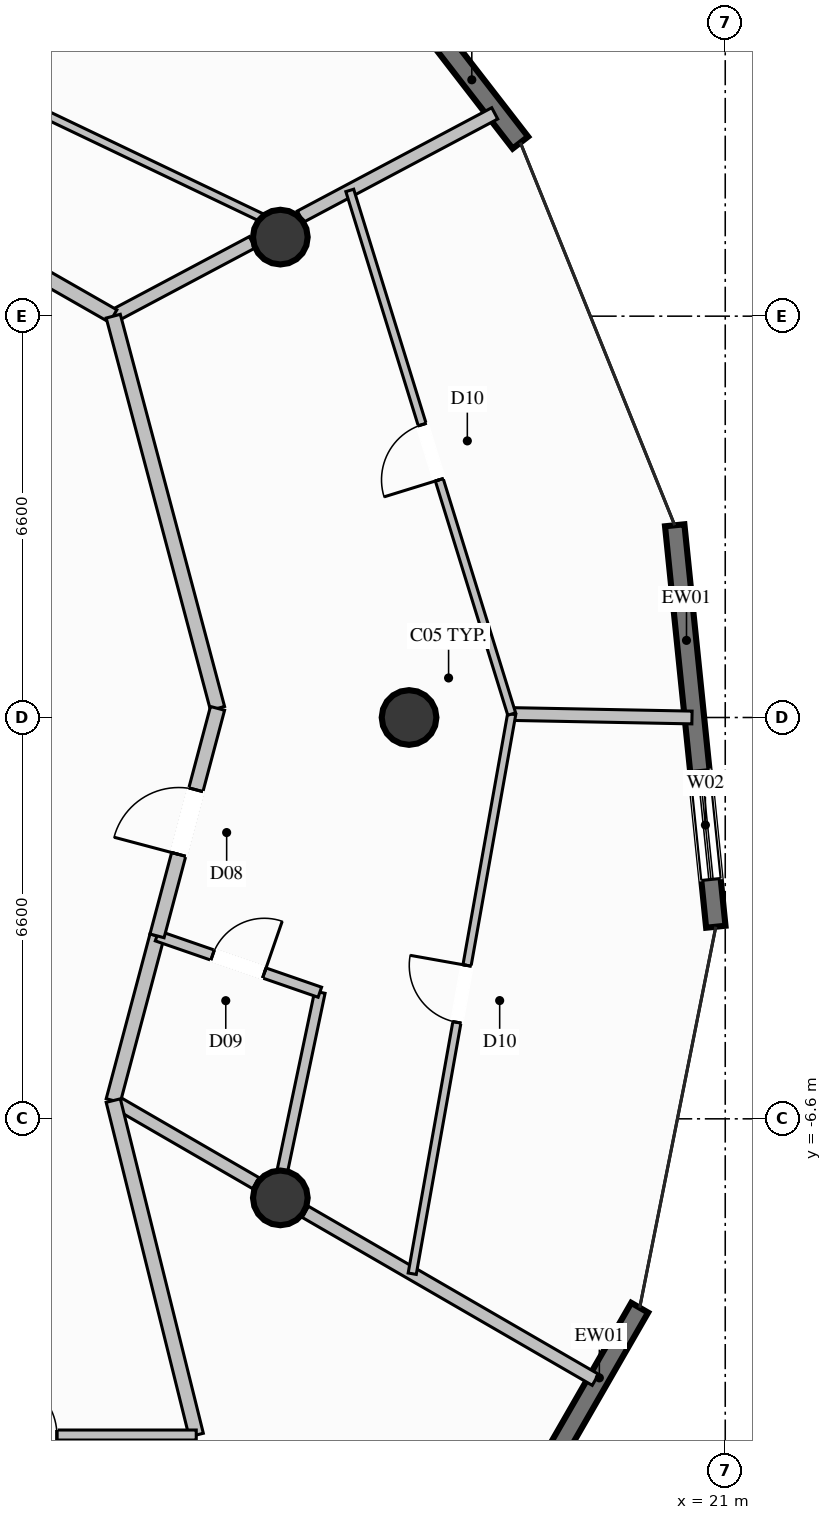
"""IFC4 building model, lengths in metres.
Left out: names, types, materials, properties, quantities, classifications, styles, units other than length and angle.
Written with IfcOpenShell. Run it as: python <this file> out.ifc"""

import sys

from ifc_helpers import new_model, si_unit, direction, frame, frame_2d, origin, origin_2d, place, context, subcontext, project, spatial, rectangle, circle, extrude, element, fill, save


model = new_model("IFC4")
c1 = context("Model", 3, precision=1e-05, world=origin(), true_north=direction((0.0, 1.0)))
c2 = subcontext(c1, "Body", "Model", "MODEL_VIEW")
j1 = project(units=[si_unit("LENGTHUNIT", "METRE"), si_unit("PLANEANGLEUNIT", "RADIAN")], contexts=[c1])
p1 = place(None, origin())
s1 = spatial("IfcSite", under=j1, at=p1, CompositionType="ELEMENT")
p2 = place(p1, origin())
s2 = spatial("IfcBuilding", under=s1, at=p2, CompositionType="ELEMENT")
p3 = place(p2, frame((0.0, 0.0, 191.2)))
s3 = spatial("IfcBuildingStorey", under=s2, at=p3, CompositionType="ELEMENT", Elevation=191.2)
for number, where, z_axis, x_axis in (
    (1, (15.8, 0.0, 0.0), (0.0, 0.0, 1.0), (1.0, 0.0, 0.0)),
    (2, (13.683, 7.9, 0.0), (0.0, 0.0, 1.0), (1.0, 0.0, 0.0)),
    (3, (13.683, -7.9, 0.0), (0.0, 0.0, 1.0), (1.0, 0.0, 0.0)),
):
    element("IfcColumn", number, at=place(p3, frame(where, z_axis=z_axis, x_axis=x_axis)), inside=s3, PredefinedType="COLUMN", context=c2, shape_type="SweptSolid", body=[
        extrude(circle(Radius=0.45, at=origin_2d()), origin(), (0.0, 0.0, 1.0), 3.6),
    ])
p4 = place(p3, frame((19.593, -9.706, 0.0), z_axis=(0.0, 0.0, 1.0), x_axis=(-0.498529467111, -0.866872753305, 0.0)))
e4 = element("IfcWall", 4, at=p4, inside=s3, PredefinedType="SOLIDWALL", context=c2, shape_type="SweptSolid", body=[
    extrude(rectangle(XDim=6.132, YDim=0.32, at=frame_2d((3.066, 0.0))), origin(), (0.0, 0.0, 1.0), 3.36),
])
p5 = place(p4, frame((2.912, 0.0, 0.35)))
e5 = element("IfcOpeningElement", 5, at=p5, cuts=e4, PredefinedType="OPENING", context=c2, shape_type="SweptSolid", body=[
    extrude(rectangle(XDim=1.8, YDim=2.6, at=frame_2d((0.9, 1.3))), frame((0.0, 0.17, 0.0), z_axis=(0.0, -1.0, 0.0), x_axis=(1.0, 0.0, 0.0)), (0.0, 0.0, 1.0), 0.34),
])
p6 = place(p3, frame((20.169, 3.161, 0.0), z_axis=(0.0, 0.0, 1.0), x_axis=(0.101867372905, -0.994797988708, 0.0)))
e6 = element("IfcWall", 6, at=p6, inside=s3, PredefinedType="SOLIDWALL", context=c2, shape_type="SweptSolid", body=[
    extrude(rectangle(XDim=6.636, YDim=0.32, at=frame_2d((3.318, 0.0))), origin(), (0.0, 0.0, 1.0), 3.36),
])
p7 = place(p6, frame((4.055, 0.0, 0.35)))
e7 = element("IfcOpeningElement", 7, at=p7, cuts=e6, PredefinedType="OPENING", context=c2, shape_type="SweptSolid", body=[
    extrude(rectangle(XDim=1.8, YDim=2.6, at=frame_2d((0.9, 1.3))), frame((0.0, 0.17, 0.0), z_axis=(0.0, -1.0, 0.0), x_axis=(1.0, 0.0, 0.0)), (0.0, 0.0, 1.0), 0.34),
])
p8 = place(p3, frame((13.48, 14.821, 0.0), z_axis=(0.0, 0.0, 1.0), x_axis=(0.611810985794, -0.791003993455, 0.0)))
e8 = element("IfcWall", 8, at=p8, inside=s3, PredefinedType="SOLIDWALL", context=c2, shape_type="SweptSolid", body=[
    extrude(rectangle(XDim=6.785, YDim=0.32, at=frame_2d((3.393, 0.0))), origin(), (0.0, 0.0, 1.0), 3.36),
])
p9 = place(p8, frame((2.123, 0.0, 0.35)))
e9 = element("IfcOpeningElement", 9, at=p9, cuts=e8, PredefinedType="OPENING", context=c2, shape_type="SweptSolid", body=[
    extrude(rectangle(XDim=1.8, YDim=2.6, at=frame_2d((0.9, 1.3))), frame((0.0, 0.17, 0.0), z_axis=(0.0, -1.0, 0.0), x_axis=(1.0, 0.0, 0.0)), (0.0, 0.0, 1.0), 0.34),
])
p10 = place(p3, frame((10.935, 6.6, 0.0), z_axis=(0.0, 0.0, 1.0), x_axis=(0.883041221412, 0.469295430711, 0.0)))
e10 = element("IfcWall", 10, at=p10, inside=s3, PredefinedType="PARTITIONING", context=c2, shape_type="SweptSolid", body=[
    extrude(rectangle(XDim=2.589, YDim=0.21, at=frame_2d((1.294, 0.0))), origin(), (0.0, 0.0, 1.0), 2.876),
])
p11 = place(p3, frame((14.012, 8.236, 0.0), z_axis=(0.0, 0.0, 1.0), x_axis=(0.883051974866, 0.469275196112, 0.0)))
e11 = element("IfcWall", 11, at=p11, inside=s3, PredefinedType="PARTITIONING", context=c2, shape_type="SweptSolid", body=[
    extrude(rectangle(XDim=3.62, YDim=0.21, at=frame_2d((1.81, 0.0))), origin(), (0.0, 0.0, 1.0), 3.36),
])
p12 = place(p3, frame((10.935, -6.3, 0.0), z_axis=(0.0, 0.0, 1.0), x_axis=(0.865378990195, -0.50111795351, 0.0)))
e12 = element("IfcWall", 12, at=p12, inside=s3, PredefinedType="PARTITIONING", context=c2, shape_type="SweptSolid", body=[
    extrude(rectangle(XDim=2.71, YDim=0.21, at=frame_2d((1.355, 0.0))), origin(), (0.0, 0.0, 1.0), 2.876),
])
p13 = place(p3, frame((14.093, -8.129, 0.0), z_axis=(0.0, 0.0, 1.0), x_axis=(0.865389908278, -0.501099098633, 0.0)))
e13 = element("IfcWall", 13, at=p13, inside=s3, PredefinedType="PARTITIONING", context=c2, shape_type="SweptSolid", body=[
    extrude(rectangle(XDim=5.514, YDim=0.21, at=frame_2d((2.757, 0.0))), origin(), (0.0, 0.0, 1.0), 3.36),
])
p14 = place(p3, frame((7.35, 8.65, 0.0), z_axis=(0.0, 0.0, 1.0), x_axis=(0.868112139229, -0.496368123193, 0.0)))
e14 = element("IfcWall", 14, at=p14, inside=s3, PredefinedType="PARTITIONING", context=c2, shape_type="SweptSolid", body=[
    extrude(rectangle(XDim=4.13, YDim=0.24, at=frame_2d((2.065, 0.0))), origin(), (0.0, 0.0, 1.0), 3.36),
])
p15 = place(p14, frame((1.515, 0.0, 0.0)))
e15 = element("IfcOpeningElement", 15, at=p15, cuts=e14, PredefinedType="OPENING", context=c2, shape_type="SweptSolid", body=[
    extrude(rectangle(XDim=1.1, YDim=2.3, at=frame_2d((0.55, 1.15))), frame((0.0, 0.13, 0.0), z_axis=(0.0, -1.0, 0.0), x_axis=(1.0, 0.0, 0.0)), (0.0, 0.0, 1.0), 0.26),
])
p16 = place(p3, frame((2.32, 13.502, 0.0), z_axis=(0.0, 0.0, 1.0), x_axis=(0.90230783313, -0.431092303656, 0.0)))
e16 = element("IfcWall", 16, at=p16, inside=s3, PredefinedType="PARTITIONING", context=c2, shape_type="SweptSolid", body=[
    extrude(rectangle(XDim=12.608, YDim=0.135, at=frame_2d((6.304, 0.0))), origin(), (0.0, 0.0, 1.0), 2.929),
])
p17 = place(p16, frame((5.829, 0.0, 0.0)))
e17 = element("IfcOpeningElement", 17, at=p17, cuts=e16, PredefinedType="OPENING", context=c2, shape_type="SweptSolid", body=[
    extrude(rectangle(XDim=0.95, YDim=2.1, at=frame_2d((0.475, 1.05))), frame((0.0, 0.078, 0.0), z_axis=(0.0, -1.0, 0.0), x_axis=(1.0, 0.0, 0.0)), (0.0, 0.0, 1.0), 0.155),
])
p18 = place(p3, frame((10.935, -6.3, 0.0), z_axis=(0.0, 0.0, 1.0), x_axis=(0.25685481711, 0.966450000221, 0.0)))
e18 = element("IfcWall", 18, at=p18, inside=s3, PredefinedType="PARTITIONING", context=c2, shape_type="SweptSolid", body=[
    extrude(rectangle(XDim=2.803, YDim=0.24, at=frame_2d((1.401, 0.0))), origin(), (0.0, 0.0, 1.0), 3.36),
])
p19 = place(p3, frame((13.631, -7.861, 0.0), z_axis=(0.0, 0.0, 1.0), x_axis=(0.205480954127, 0.978661114733, 0.0)))
e19 = element("IfcWall", 19, at=p19, inside=s3, PredefinedType="PLUMBINGWALL", context=c2, shape_type="SweptSolid", body=[
    extrude(rectangle(XDim=3.416, YDim=0.175, at=frame_2d((1.708, 0.0))), origin(), (0.0, 0.0, 1.0), 2.929),
])
p20 = place(p3, frame((11.655, -3.591, 0.0), z_axis=(0.0, 0.0, 1.0), x_axis=(0.944985049189, -0.327113522816, 0.0)))
e20 = element("IfcWall", 20, at=p20, inside=s3, PredefinedType="PLUMBINGWALL", context=c2, shape_type="SweptSolid", body=[
    extrude(rectangle(XDim=2.834, YDim=0.175, at=frame_2d((1.417, 0.0))), origin(), (0.0, 0.0, 1.0), 3.36),
])
p21 = place(p20, frame((0.967, 0.0, 0.0)))
e21 = element("IfcOpeningElement", 21, at=p21, cuts=e20, PredefinedType="OPENING", context=c2, shape_type="SweptSolid", body=[
    extrude(rectangle(XDim=0.9, YDim=2.1, at=frame_2d((0.45, 1.05))), frame((0.0, 0.098, 0.0), z_axis=(0.0, -1.0, 0.0), x_axis=(1.0, 0.0, 0.0)), (0.0, 0.0, 1.0), 0.195),
])
p22 = place(p3, frame((17.488, 0.057, 0.0), z_axis=(0.0, 0.0, 1.0), x_axis=(0.999815991263, -0.019182899042, 0.0)))
e22 = element("IfcWall", 22, at=p22, inside=s3, PredefinedType="PARTITIONING", context=c2, shape_type="SweptSolid", body=[
    extrude(rectangle(XDim=2.965, YDim=0.21, at=frame_2d((1.483, 0.0))), origin(), (0.0, 0.0, 1.0), 3.36),
])
p23 = place(p3, frame((12.65, 0.15, 0.0), z_axis=(0.0, 0.0, 1.0), x_axis=(-0.256934024047, 0.966428945804, 0.0)))
e23 = element("IfcWall", 23, at=p23, inside=s3, PredefinedType="PARTITIONING", context=c2, shape_type="SweptSolid", body=[
    extrude(rectangle(XDim=6.674, YDim=0.24, at=frame_2d((3.337, 0.0))), origin(), (0.0, 0.0, 1.0), 3.36),
])
p24 = place(p3, frame((11.655, -3.591, 0.0), z_axis=(0.0, 0.0, 1.0), x_axis=(0.257007037833, 0.966409531464, 0.0)))
e24 = element("IfcWall", 24, at=p24, inside=s3, PredefinedType="PARTITIONING", context=c2, shape_type="SweptSolid", body=[
    extrude(rectangle(XDim=3.871, YDim=0.24, at=frame_2d((1.936, 0.0))), origin(), (0.0, 0.0, 1.0), 3.042),
])
p25 = place(p24, frame((1.386, 0.0, 0.0)))
e25 = element("IfcOpeningElement", 25, at=p25, cuts=e24, PredefinedType="OPENING", context=c2, shape_type="SweptSolid", body=[
    extrude(rectangle(XDim=1.1, YDim=2.3, at=frame_2d((0.55, 1.15))), frame((0.0, 0.13, 0.0), z_axis=(0.0, -1.0, 0.0), x_axis=(1.0, 0.0, 0.0)), (0.0, 0.0, 1.0), 0.26),
])
p26 = place(p3, frame((15.852, -9.147, 0.0), z_axis=(0.0, 0.0, 1.0), x_axis=(0.17500689307, 0.984567208157, 0.0)))
e26 = element("IfcWall", 26, at=p26, inside=s3, PredefinedType="PARTITIONING", context=c2, shape_type="SweptSolid", body=[
    extrude(rectangle(XDim=9.348, YDim=0.135, at=frame_2d((4.674, 0.0))), origin(), (0.0, 0.0, 1.0), 3.36),
])
p27 = place(p26, frame((4.199, 0.0, 0.0)))
e27 = element("IfcOpeningElement", 27, at=p27, cuts=e26, PredefinedType="OPENING", context=c2, shape_type="SweptSolid", body=[
    extrude(rectangle(XDim=0.95, YDim=2.1, at=frame_2d((0.475, 1.05))), frame((0.0, 0.078, 0.0), z_axis=(0.0, -1.0, 0.0), x_axis=(1.0, 0.0, 0.0)), (0.0, 0.0, 1.0), 0.155),
])
p28 = place(p3, frame((17.488, 0.057, 0.0), z_axis=(0.0, 0.0, 1.0), x_axis=(-0.295455960415, 0.955356360451, 0.0)))
e28 = element("IfcWall", 28, at=p28, inside=s3, PredefinedType="PARTITIONING", context=c2, shape_type="SweptSolid", body=[
    extrude(rectangle(XDim=9.013, YDim=0.135, at=frame_2d((4.507, 0.0))), origin(), (0.0, 0.0, 1.0), 3.36),
])
p29 = place(p28, frame((4.032, 0.0, 0.0)))
e29 = element("IfcOpeningElement", 29, at=p29, cuts=e28, PredefinedType="OPENING", context=c2, shape_type="SweptSolid", body=[
    extrude(rectangle(XDim=0.95, YDim=2.1, at=frame_2d((0.475, 1.05))), frame((0.0, 0.078, 0.0), z_axis=(0.0, -1.0, 0.0), x_axis=(1.0, 0.0, 0.0)), (0.0, 0.0, 1.0), 0.155),
])
p30 = place(p3, frame((12.3, -11.8, 0.0), z_axis=(0.0, 0.0, 1.0), x_axis=(-0.240872801332, 0.970556692614, 0.0)))
e30 = element("IfcWall", 30, at=p30, inside=s3, PredefinedType="PARTITIONING", context=c2, shape_type="SweptSolid", body=[
    extrude(rectangle(XDim=5.667, YDim=0.24, at=frame_2d((2.833, 0.0))), origin(), (0.0, 0.0, 1.0), 3.36),
])
p31 = place(p3, frame((6.765, -11.8, 0.0), z_axis=(0.0, 0.0, 1.0), x_axis=(1.0, 0.0, 0.0)))
e31 = element("IfcWall", 31, at=p31, inside=s3, PredefinedType="PARTITIONING", context=c2, shape_type="SweptSolid", body=[
    extrude(rectangle(XDim=5.535, YDim=0.165, at=frame_2d((2.768, 0.0))), origin(), (0.0, 0.0, 1.0), 3.36),
])
p32 = place(p31, frame((2.293, 0.0, 0.0)))
e32 = element("IfcOpeningElement", 32, at=p32, cuts=e31, PredefinedType="OPENING", context=c2, shape_type="SweptSolid", body=[
    extrude(rectangle(XDim=0.95, YDim=2.1, at=frame_2d((0.475, 1.05))), frame((0.0, 0.093, 0.0), z_axis=(0.0, -1.0, 0.0), x_axis=(1.0, 0.0, 0.0)), (0.0, 0.0, 1.0), 0.185),
])
p33 = place(p7, origin())
e33 = element("IfcWindow", 33, at=p33, inside=s3, PartitioningType="SINGLE_PANEL", PredefinedType="WINDOW", context=c2, shape_type="SweptSolid", body=[
    extrude(rectangle(XDim=1.8, YDim=2.6, at=frame_2d((0.9, 1.3))), frame((0.0, 0.03, 0.0), z_axis=(0.0, -1.0, 0.0), x_axis=(1.0, 0.0, 0.0)), (0.0, 0.0, 1.0), 0.06),
])
fill(e7, e33)
p34 = place(p21, origin())
e34 = element("IfcDoor", 34, at=p34, inside=s3, OperationType="SINGLE_SWING_RIGHT", PredefinedType="DOOR", context=c2, shape_type="SweptSolid", body=[
    extrude(rectangle(XDim=0.9, YDim=2.1, at=frame_2d((0.45, 1.05))), frame((0.0, 0.025, 0.0), z_axis=(0.0, -1.0, 0.0), x_axis=(1.0, 0.0, 0.0)), (0.0, 0.0, 1.0), 0.05),
])
fill(e21, e34)
p35 = place(p25, origin())
e35 = element("IfcDoor", 35, at=p35, inside=s3, OperationType="SINGLE_SWING_LEFT", PredefinedType="DOOR", context=c2, shape_type="SweptSolid", body=[
    extrude(rectangle(XDim=1.1, YDim=2.3, at=frame_2d((0.55, 1.15))), frame((0.0, 0.025, 0.0), z_axis=(0.0, -1.0, 0.0), x_axis=(1.0, 0.0, 0.0)), (0.0, 0.0, 1.0), 0.05),
])
fill(e25, e35)
p36 = place(p27, origin())
e36 = element("IfcDoor", 36, at=p36, inside=s3, OperationType="SINGLE_SWING_RIGHT", PredefinedType="DOOR", context=c2, shape_type="SweptSolid", body=[
    extrude(rectangle(XDim=0.95, YDim=2.1, at=frame_2d((0.475, 1.05))), frame((0.0, 0.025, 0.0), z_axis=(0.0, -1.0, 0.0), x_axis=(1.0, 0.0, 0.0)), (0.0, 0.0, 1.0), 0.05),
])
fill(e27, e36)
p37 = place(p29, origin())
e37 = element("IfcDoor", 37, at=p37, inside=s3, OperationType="SINGLE_SWING_LEFT", PredefinedType="DOOR", context=c2, shape_type="SweptSolid", body=[
    extrude(rectangle(XDim=0.95, YDim=2.1, at=frame_2d((0.475, 1.05))), frame((0.0, 0.025, 0.0), z_axis=(0.0, -1.0, 0.0), x_axis=(1.0, 0.0, 0.0)), (0.0, 0.0, 1.0), 0.05),
])
fill(e29, e37)
p38 = place(p32, origin())
e38 = element("IfcDoor", 38, at=p38, inside=s3, OperationType="SINGLE_SWING_LEFT", PredefinedType="DOOR", context=c2, shape_type="SweptSolid", body=[
    extrude(rectangle(XDim=0.95, YDim=2.1, at=frame_2d((0.475, 1.05))), frame((0.0, 0.025, 0.0), z_axis=(0.0, -1.0, 0.0), x_axis=(1.0, 0.0, 0.0)), (0.0, 0.0, 1.0), 0.05),
])
fill(e32, e38)
save(model, sys.argv[1])
